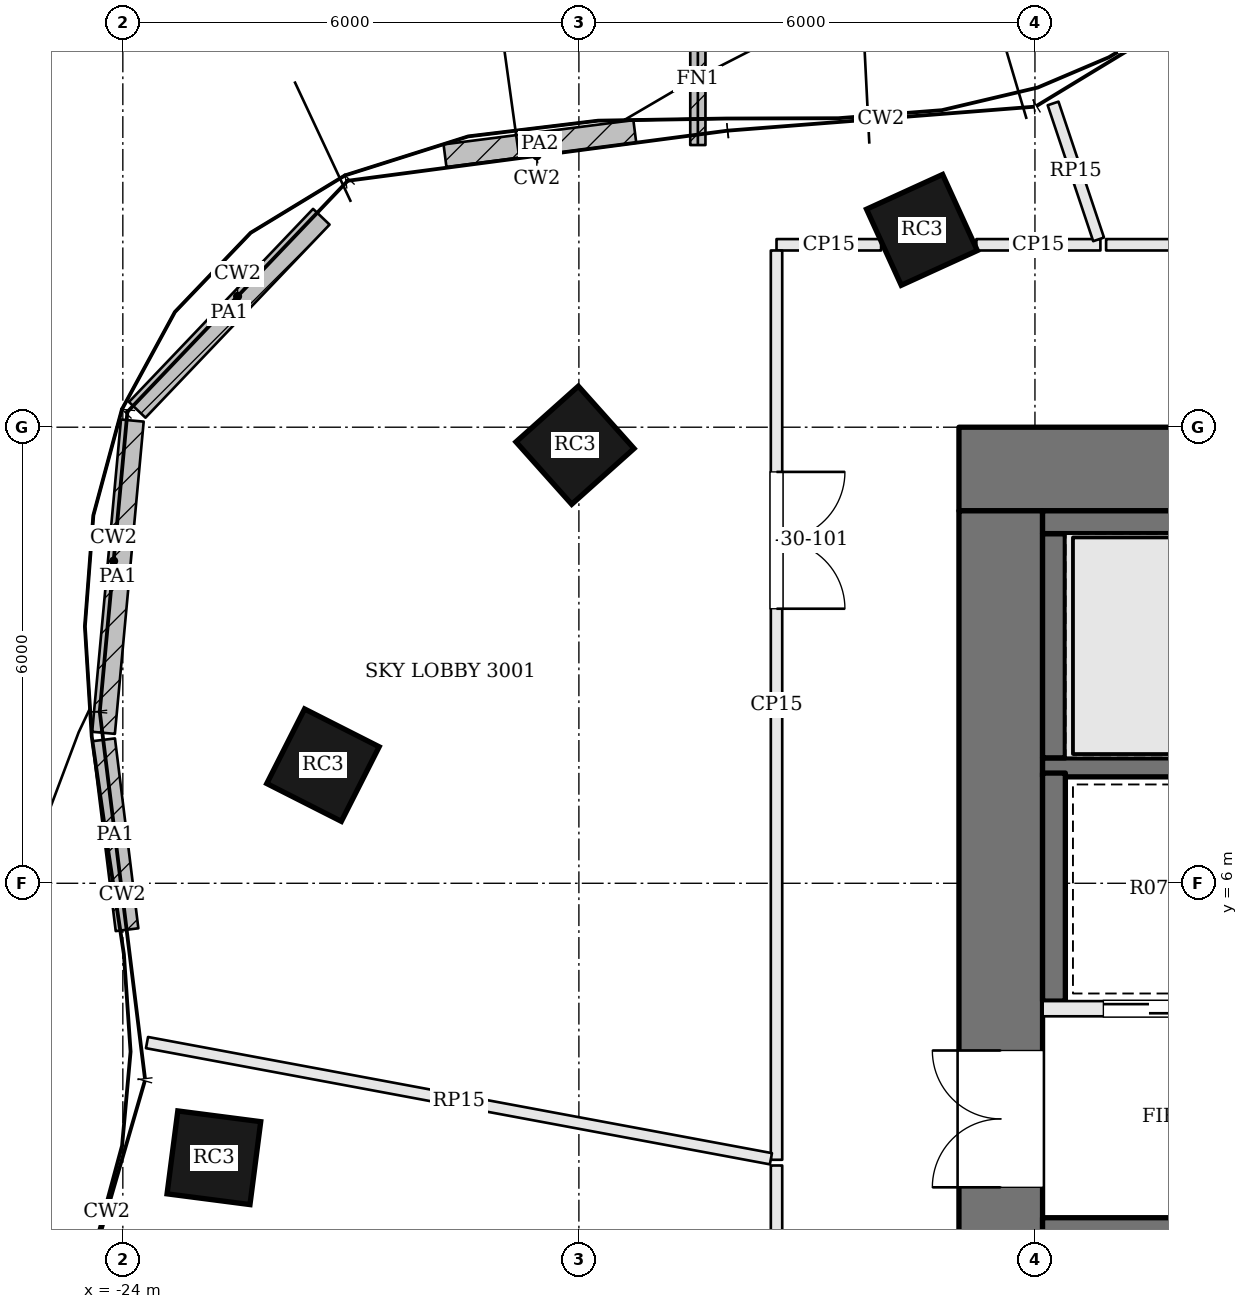
"""IFC4 building model, lengths in metres.
Left out: names, types, materials, properties, quantities, classifications, styles, units other than length and angle.
Written with IfcOpenShell. Run it as: python <this file> out.ifc"""

import sys

from ifc_helpers import new_model, si_unit, direction, frame, frame_2d, origin, origin_2d, place, context, subcontext, project, spatial, rectangle, extrude, element, fill, save


model = new_model("IFC4")
c1 = context("Model", 3, precision=1e-05, world=origin(), true_north=direction((0.0, 1.0)))
c2 = subcontext(c1, "Body", "Model", "MODEL_VIEW")
j1 = project(units=[si_unit("LENGTHUNIT", "METRE"), si_unit("PLANEANGLEUNIT", "RADIAN")], contexts=[c1])
p1 = place(None, origin())
s1 = spatial("IfcSite", under=j1, at=p1, CompositionType="ELEMENT")
p2 = place(p1, origin())
s2 = spatial("IfcBuilding", under=s1, at=p2, CompositionType="ELEMENT")
p3 = place(p2, frame((0.0, 0.0, 125.7)))
s3 = spatial("IfcBuildingStorey", under=s2, at=p3, CompositionType="ELEMENT", Elevation=125.7)
p4 = place(p3, frame((-13.0, 11.45, 0.0), z_axis=(0.0, 0.0, 1.0), x_axis=(1.0, 0.0, 0.0)))
e1 = element("IfcWall", 1, at=p4, inside=s3, PredefinedType="SHEAR", context=c2, shape_type="SweptSolid", body=[
    extrude(rectangle(XDim=26.0, YDim=1.1, at=frame_2d((13.0, 0.0))), origin(), (0.0, 0.0, 1.0), 4.8),
])
p5 = place(p4, frame((9.375, 0.0, 0.0)))
e2 = element("IfcOpeningElement", 2, at=p5, cuts=e1, PredefinedType="OPENING", context=c2, shape_type="SweptSolid", body=[
    extrude(rectangle(XDim=0.7, YDim=2.1, at=frame_2d((0.35, 1.05))), frame((0.0, 0.56, 0.0), z_axis=(0.0, -1.0, 0.0), x_axis=(1.0, 0.0, 0.0)), (0.0, 0.0, 1.0), 1.12),
])
p6 = place(p4, frame((11.825, 0.0, 0.0)))
e3 = element("IfcOpeningElement", 3, at=p6, cuts=e1, PredefinedType="OPENING", context=c2, shape_type="SweptSolid", body=[
    extrude(rectangle(XDim=0.7, YDim=2.1, at=frame_2d((0.35, 1.05))), frame((0.0, 0.56, 0.0), z_axis=(0.0, -1.0, 0.0), x_axis=(1.0, 0.0, 0.0)), (0.0, 0.0, 1.0), 1.12),
])
p7 = place(p4, frame((13.725, 0.0, 0.0)))
e4 = element("IfcOpeningElement", 4, at=p7, cuts=e1, PredefinedType="OPENING", context=c2, shape_type="SweptSolid", body=[
    extrude(rectangle(XDim=1.0, YDim=2.1, at=frame_2d((0.5, 1.05))), frame((0.0, 0.56, 0.0), z_axis=(0.0, -1.0, 0.0), x_axis=(1.0, 0.0, 0.0)), (0.0, 0.0, 1.0), 1.12),
])
p8 = place(p4, frame((16.175, 0.0, 0.0)))
e5 = element("IfcOpeningElement", 5, at=p8, cuts=e1, PredefinedType="OPENING", context=c2, shape_type="SweptSolid", body=[
    extrude(rectangle(XDim=1.0, YDim=2.1, at=frame_2d((0.5, 1.05))), frame((0.0, 0.56, 0.0), z_axis=(0.0, -1.0, 0.0), x_axis=(1.0, 0.0, 0.0)), (0.0, 0.0, 1.0), 1.12),
])
p9 = place(p3, frame((-12.45, -1.9, 0.0), z_axis=(0.0, 0.0, 1.0), x_axis=(0.0, 1.0, 0.0)))
e6 = element("IfcWall", 6, at=p9, inside=s3, PredefinedType="SHEAR", context=c2, shape_type="SweptSolid", body=[
    extrude(rectangle(XDim=12.8, YDim=1.1, at=frame_2d((6.4, 0.0))), origin(), (0.0, 0.0, 1.0), 4.8),
])
p10 = place(p9, frame((3.9, 0.0, 0.0)))
e7 = element("IfcOpeningElement", 7, at=p10, cuts=e6, PredefinedType="OPENING", context=c2, shape_type="SweptSolid", body=[
    extrude(rectangle(XDim=1.8, YDim=2.1, at=frame_2d((0.9, 1.05))), frame((0.0, 0.56, 0.0), z_axis=(0.0, -1.0, 0.0), x_axis=(1.0, 0.0, 0.0)), (0.0, 0.0, 1.0), 1.12),
])
for number, where, z_axis, x_axis in (
    (8, (-13.487, 14.596, -0.7), (0.0, 0.0, 1.0), (-0.91, -0.415, 0.0)),
    (9, (-18.051, 11.763, -0.7), (0.0, 0.0, 1.0), (-0.746, -0.666, 0.0)),
    (10, (-21.367, 7.554, -0.7), (0.0, 0.0, 1.0), (-0.452, -0.892, 0.0)),
    (11, (-22.802, 2.389, -0.7), (0.0, 0.0, 1.0), (-0.129, -0.992, 0.0)),
):
    element("IfcColumn", number, at=place(p3, frame(where, z_axis=z_axis, x_axis=x_axis)), inside=s3, PredefinedType="COLUMN", context=c2, shape_type="SweptSolid", body=[
        extrude(rectangle(XDim=1.1, YDim=1.1, at=origin_2d()), origin(), (0.0, 0.0, 1.0), 5.5),
    ])
p11 = place(p3, frame((-16.435, 15.712, 0.0), z_axis=(0.0, 0.0, 1.0), x_axis=(0.000279017846, 0.999999961075, 0.0)))
e12 = element("IfcWall", 12, at=p11, inside=s3, PredefinedType="SOLIDWALL", context=c2, shape_type="SweptSolid", body=[
    extrude(rectangle(XDim=1.75, YDim=0.2, at=frame_2d((0.875, 0.0))), origin(), (0.0, 0.0, 1.0), 4.6),
])
p12 = place(p3, frame((-19.762, 15.572, 0.0), z_axis=(0.0, 0.0, 1.0), x_axis=(0.991935518955, 0.126743545144, 0.0)))
e13 = element("IfcWall", 13, at=p12, inside=s3, PredefinedType="PARAPET", context=c2, shape_type="SweptSolid", body=[
    extrude(rectangle(XDim=2.518, YDim=0.3, at=frame_2d((1.259, 0.0))), origin(), (0.0, 0.0, 1.0), 1.1),
])
p13 = place(p3, frame((-21.388, 14.769, 4.8), z_axis=(0.0, 0.0, 1.0), x_axis=(-0.690144808601, -0.723671294969, 0.0)))
e14 = element("IfcWall", 14, at=p13, inside=s3, PredefinedType="PARAPET", context=c2, shape_type="SweptSolid", body=[
    extrude(rectangle(XDim=3.51, YDim=0.3, at=frame_2d((1.755, 0.0))), origin(), (0.0, 0.0, 1.0), 1.1),
])
p14 = place(p3, frame((-23.875, 12.087, 4.8), z_axis=(0.0, 0.0, 1.0), x_axis=(-0.091842900475, -0.995773509204, 0.0)))
e15 = element("IfcWall", 15, at=p14, inside=s3, PredefinedType="PARAPET", context=c2, shape_type="SweptSolid", body=[
    extrude(rectangle(XDim=4.125, YDim=0.3, at=frame_2d((2.063, 0.0))), origin(), (0.0, 0.0, 1.0), 1.1),
])
p15 = place(p3, frame((-24.252, 7.887, 4.8), z_axis=(0.0, 0.0, 1.0), x_axis=(0.122315432018, -0.992491277085, 0.0)))
e16 = element("IfcWall", 16, at=p15, inside=s3, PredefinedType="PARAPET", context=c2, shape_type="SweptSolid", body=[
    extrude(rectangle(XDim=2.517, YDim=0.3, at=frame_2d((1.258, 0.0))), origin(), (0.0, 0.0, 1.0), 1.1),
])
p16 = place(p3, frame((-11.9, 1.475, 0.0), z_axis=(0.0, 0.0, 1.0), x_axis=(1.0, 0.0, 0.0)))
e17 = element("IfcWall", 17, at=p16, inside=s3, PredefinedType="SOLIDWALL", context=c2, shape_type="SweptSolid", body=[
    extrude(rectangle(XDim=6.8, YDim=0.25, at=frame_2d((3.4, 0.0))), origin(), (0.0, 0.0, 1.0), 4.6),
])
p17 = place(p16, frame((5.5, 0.0, 0.0)))
e18 = element("IfcOpeningElement", 18, at=p17, cuts=e17, PredefinedType="OPENING", context=c2, shape_type="SweptSolid", body=[
    extrude(rectangle(XDim=1.2, YDim=2.1, at=frame_2d((0.6, 1.05))), frame((0.0, 0.135, 0.0), z_axis=(0.0, -1.0, 0.0), x_axis=(1.0, 0.0, 0.0)), (0.0, 0.0, 1.0), 0.27),
])
p18 = place(p3, frame((-11.9, 4.35, 0.0), z_axis=(0.0, 0.0, 1.0), x_axis=(1.0, 0.0, 0.0)))
e19 = element("IfcWall", 19, at=p18, inside=s3, PredefinedType="SOLIDWALL", context=c2, shape_type="SweptSolid", body=[
    extrude(rectangle(XDim=6.8, YDim=0.2, at=frame_2d((3.4, 0.0))), origin(), (0.0, 0.0, 1.0), 4.6),
])
p19 = place(p18, frame((4.1, 0.0, 0.0)))
e20 = element("IfcOpeningElement", 20, at=p19, cuts=e19, PredefinedType="OPENING", context=c2, shape_type="SweptSolid", body=[
    extrude(rectangle(XDim=1.2, YDim=2.1, at=frame_2d((0.6, 1.05))), frame((0.0, 0.11, 0.0), z_axis=(0.0, -1.0, 0.0), x_axis=(1.0, 0.0, 0.0)), (0.0, 0.0, 1.0), 0.22),
])
p20 = place(p18, frame((0.8, 0.0, 0.0)))
e21 = element("IfcOpeningElement", 21, at=p20, cuts=e19, PredefinedType="OPENING", context=c2, shape_type="SweptSolid", body=[
    extrude(rectangle(XDim=1.2, YDim=2.1, at=frame_2d((0.6, 1.05))), frame((0.0, 0.11, 0.0), z_axis=(0.0, -1.0, 0.0), x_axis=(1.0, 0.0, 0.0)), (0.0, 0.0, 1.0), 0.22),
])
p21 = place(p3, frame((-11.9, 7.525, 0.0), z_axis=(0.0, 0.0, 1.0), x_axis=(1.0, 0.0, 0.0)))
e22 = element("IfcWall", 22, at=p21, inside=s3, PredefinedType="SOLIDWALL", context=c2, shape_type="SweptSolid", body=[
    extrude(rectangle(XDim=6.8, YDim=0.25, at=frame_2d((3.4, 0.0))), origin(), (0.0, 0.0, 1.0), 4.6),
])
p22 = place(p21, frame((5.5, 0.0, 0.0)))
e23 = element("IfcOpeningElement", 23, at=p22, cuts=e22, PredefinedType="OPENING", context=c2, shape_type="SweptSolid", body=[
    extrude(rectangle(XDim=1.2, YDim=2.1, at=frame_2d((0.6, 1.05))), frame((0.0, 0.135, 0.0), z_axis=(0.0, -1.0, 0.0), x_axis=(1.0, 0.0, 0.0)), (0.0, 0.0, 1.0), 0.27),
])
p23 = place(p3, frame((-11.75, 4.45, 0.0), z_axis=(0.0, 0.0, 1.0), x_axis=(0.0, 1.0, 0.0)))
e24 = element("IfcWall", 24, at=p23, inside=s3, PredefinedType="SOLIDWALL", context=c2, shape_type="SweptSolid", body=[
    extrude(rectangle(XDim=3.0, YDim=0.3, at=frame_2d((1.5, 0.0))), origin(), (0.0, 0.0, 1.0), 4.6),
])
p24 = place(p3, frame((-11.75, 7.65, 0.0), z_axis=(0.0, 0.0, 1.0), x_axis=(0.0, 1.0, 0.0)))
e25 = element("IfcWall", 25, at=p24, inside=s3, PredefinedType="SOLIDWALL", context=c2, shape_type="SweptSolid", body=[
    extrude(rectangle(XDim=2.95, YDim=0.3, at=frame_2d((1.475, 0.0))), origin(), (0.0, 0.0, 1.0), 4.6),
])
p25 = place(p3, frame((-11.9, 10.75, 0.0), z_axis=(0.0, 0.0, 1.0), x_axis=(1.0, 0.0, 0.0)))
e26 = element("IfcWall", 26, at=p25, inside=s3, PredefinedType="SOLIDWALL", context=c2, shape_type="SweptSolid", body=[
    extrude(rectangle(XDim=6.8, YDim=0.3, at=frame_2d((3.4, 0.0))), origin(), (0.0, 0.0, 1.0), 4.6),
])
p26 = place(p3, frame((-11.139, 14.4, 0.0), z_axis=(0.0, 0.0, 1.0), x_axis=(-1.0, 0.0, 0.0)))
e27 = element("IfcWall", 27, at=p26, inside=s3, PredefinedType="PARTITIONING", context=c2, shape_type="SweptSolid", body=[
    extrude(rectangle(XDim=1.632, YDim=0.15, at=frame_2d((0.816, 0.0))), origin(), (0.0, 0.0, 1.0), 4.098),
])
p27 = place(p3, frame((-14.024, 14.4, 0.0), z_axis=(0.0, 0.0, 1.0), x_axis=(-1.0, 0.0, 0.0)))
e28 = element("IfcWall", 28, at=p27, inside=s3, PredefinedType="PARTITIONING", context=c2, shape_type="SweptSolid", body=[
    extrude(rectangle(XDim=1.376, YDim=0.15, at=frame_2d((0.688, 0.0))), origin(), (0.0, 0.0, 1.0), 4.098),
])
p28 = place(p3, frame((-15.4, 14.325, 0.0), z_axis=(0.0, 0.0, 1.0), x_axis=(0.0, -1.0, 0.0)))
e29 = element("IfcWall", 29, at=p28, inside=s3, PredefinedType="PARTITIONING", context=c2, shape_type="SweptSolid", body=[
    extrude(rectangle(XDim=11.963, YDim=0.15, at=frame_2d((5.981, 0.0))), origin(), (0.0, 0.0, 1.0), 4.098),
])
p29 = place(p28, frame((2.913, 0.0, 0.0)))
e30 = element("IfcOpeningElement", 30, at=p29, cuts=e29, PredefinedType="OPENING", context=c2, shape_type="SweptSolid", body=[
    extrude(rectangle(XDim=1.8, YDim=2.1, at=frame_2d((0.9, 1.05))), frame((0.0, 0.085, 0.0), z_axis=(0.0, -1.0, 0.0), x_axis=(1.0, 0.0, 0.0)), (0.0, 0.0, 1.0), 0.17),
])
p30 = place(p3, frame((-11.761, 16.26, 0.0), z_axis=(0.0, 0.0, 1.0), x_axis=(0.317547878941, -0.948242239399, 0.0)))
e31 = element("IfcWall", 31, at=p30, inside=s3, PredefinedType="PARTITIONING", context=c2, shape_type="SweptSolid", body=[
    extrude(rectangle(XDim=1.886, YDim=0.15, at=frame_2d((0.943, 0.0))), origin(), (0.0, 0.0, 1.0), 4.098),
])
p31 = place(p3, frame((-23.682, 3.904, 0.0), z_axis=(0.0, 0.0, 1.0), x_axis=(0.983104115743, -0.183047255125, 0.0)))
e32 = element("IfcWall", 32, at=p31, inside=s3, PredefinedType="PARTITIONING", context=c2, shape_type="SweptSolid", body=[
    extrude(rectangle(XDim=8.349, YDim=0.15, at=frame_2d((4.175, 0.0))), origin(), (0.0, 0.0, 1.0), 4.098),
])
p32 = place(p3, frame((-15.4, 2.287, 0.0), z_axis=(0.0, 0.0, 1.0), x_axis=(0.0, -1.0, 0.0)))
e33 = element("IfcWall", 33, at=p32, inside=s3, PredefinedType="PARTITIONING", context=c2, shape_type="SweptSolid", body=[
    extrude(rectangle(XDim=6.31, YDim=0.15, at=frame_2d((3.155, 0.0))), origin(), (0.0, 0.0, 1.0), 4.098),
])
p33 = place(p32, frame((2.218, 0.0, 0.0)))
e34 = element("IfcOpeningElement", 34, at=p33, cuts=e33, PredefinedType="OPENING", context=c2, shape_type="SweptSolid", body=[
    extrude(rectangle(XDim=1.8, YDim=2.1, at=frame_2d((0.9, 1.05))), frame((0.0, 0.085, 0.0), z_axis=(0.0, -1.0, 0.0), x_axis=(1.0, 0.0, 0.0)), (0.0, 0.0, 1.0), 0.17),
])
p34 = place(p3, frame((-0.185, 14.4, 0.0), z_axis=(0.0, 0.0, 1.0), x_axis=(-1.0, 0.0, 0.0)))
e35 = element("IfcWall", 35, at=p34, inside=s3, PredefinedType="PARTITIONING", context=c2, shape_type="SweptSolid", body=[
    extrude(rectangle(XDim=10.879, YDim=0.15, at=frame_2d((5.44, 0.0))), origin(), (0.0, 0.0, 1.0), 4.098),
])
p35 = place(p34, frame((4.54, 0.0, 0.0)))
e36 = element("IfcOpeningElement", 36, at=p35, cuts=e35, PredefinedType="OPENING", context=c2, shape_type="SweptSolid", body=[
    extrude(rectangle(XDim=1.8, YDim=2.1, at=frame_2d((0.9, 1.05))), frame((0.0, 0.085, 0.0), z_axis=(0.0, -1.0, 0.0), x_axis=(1.0, 0.0, 0.0)), (0.0, 0.0, 1.0), 0.17),
])
p36 = place(p10, origin())
e37 = element("IfcDoor", 37, at=p36, inside=s3, OperationType="DOUBLE_DOOR_SINGLE_SWING", PredefinedType="DOOR", context=c2, shape_type="SweptSolid", body=[
    extrude(rectangle(XDim=1.8, YDim=2.1, at=frame_2d((0.9, 1.05))), frame((0.0, 0.025, 0.0), z_axis=(0.0, -1.0, 0.0), x_axis=(1.0, 0.0, 0.0)), (0.0, 0.0, 1.0), 0.05),
])
fill(e7, e37)
p37 = place(p20, origin())
e38 = element("IfcDoor", 38, at=p37, inside=s3, OperationType="SLIDING_TO_RIGHT", PredefinedType="DOOR", context=c2, shape_type="SweptSolid", body=[
    extrude(rectangle(XDim=1.2, YDim=2.1, at=frame_2d((0.6, 1.05))), frame((0.0, 0.025, 0.0), z_axis=(0.0, -1.0, 0.0), x_axis=(1.0, 0.0, 0.0)), (0.0, 0.0, 1.0), 0.05),
])
fill(e21, e38)
p38 = place(p29, origin())
e39 = element("IfcDoor", 39, at=p38, inside=s3, OperationType="DOUBLE_DOOR_SINGLE_SWING", PredefinedType="DOOR", context=c2, shape_type="SweptSolid", body=[
    extrude(rectangle(XDim=1.8, YDim=2.1, at=frame_2d((0.9, 1.05))), frame((0.0, 0.025, 0.0), z_axis=(0.0, -1.0, 0.0), x_axis=(1.0, 0.0, 0.0)), (0.0, 0.0, 1.0), 0.05),
])
fill(e30, e39)
save(model, sys.argv[1])
